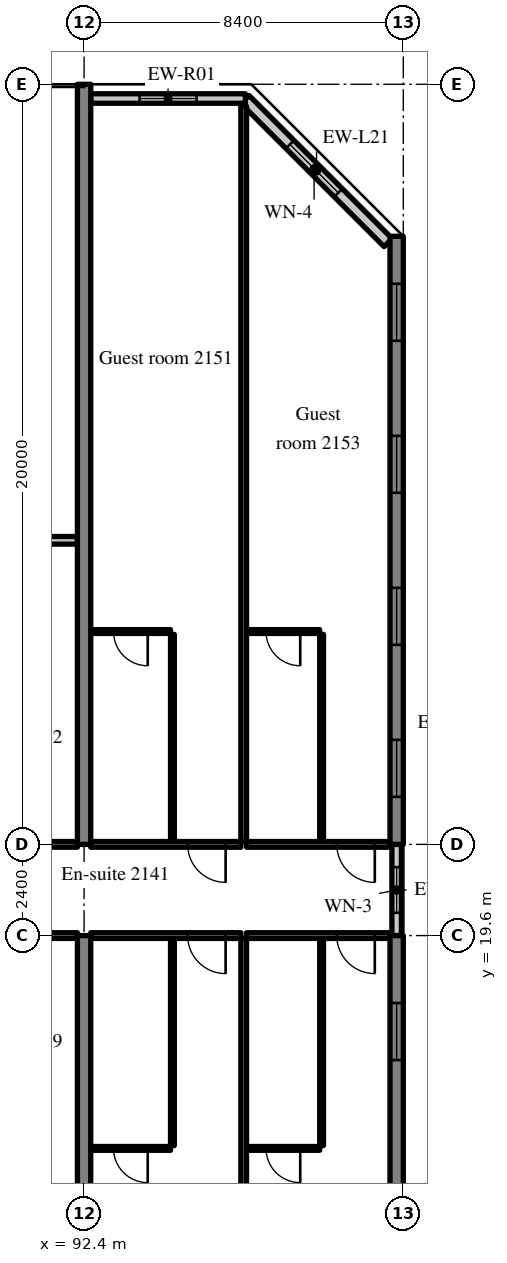
"""IFC4 building model, lengths in metres.
Left out: names, types, materials, properties, quantities, classifications, styles, units other than length and angle.
Written with IfcOpenShell. Run it as: python <this file> out.ifc"""

import sys

from ifc_helpers import new_model, si_unit, direction, frame, frame_2d, origin, place, context, subcontext, project, spatial, rectangle, extrude, source, transform, mapped, element, fill, save


model = new_model("IFC4")
c1 = context("Model", 3, precision=1e-05, world=origin(), true_north=direction((0.0, 1.0)))
c2 = subcontext(c1, "Body", "Model", "MODEL_VIEW")
j1 = project(units=[si_unit("LENGTHUNIT", "METRE"), si_unit("PLANEANGLEUNIT", "RADIAN")], contexts=[c1])
p1 = place(None, origin())
s1 = spatial("IfcSite", under=j1, at=p1, CompositionType="ELEMENT")
p2 = place(p1, origin())
s2 = spatial("IfcBuilding", under=s1, at=p2, CompositionType="ELEMENT")
p3 = place(p2, frame((0.0, 0.0, 91.4)))
s3 = spatial("IfcBuildingStorey", under=s2, at=p3, CompositionType="ELEMENT", Elevation=91.4)
m1 = source(origin(), c2, "Body", "SweptSolid", [
    extrude(rectangle(XDim=14.1, YDim=0.35, at=frame_2d((7.05, 0.0))), origin(), (0.0, 0.0, 1.0), 3.52),
])
p4 = place(p3, frame((92.4, 5.5, 0.0), z_axis=(0.0, 0.0, 1.0), x_axis=(0.0, 1.0, 0.0)))
e1 = element("IfcWall", 1, at=p4, inside=s3, PredefinedType="SHEAR", context=c2, shape_type="MappedRepresentation", body=[
    mapped(m1, transform((0.0, 0.0, 0.0), scale=1.0)),
])
m2 = source(origin(), c2, "Body", "SweptSolid", [
    extrude(rectangle(XDim=20.0, YDim=0.35, at=frame_2d((10.0, 0.0))), origin(), (0.0, 0.0, 1.0), 3.52),
])
p5 = place(p3, frame((92.4, 22.0, 0.0), z_axis=(0.0, 0.0, 1.0), x_axis=(0.0, 1.0, 0.0)))
e2 = element("IfcWall", 2, at=p5, inside=s3, PredefinedType="SHEAR", context=c2, shape_type="MappedRepresentation", body=[
    mapped(m2, transform((0.0, 0.0, 0.0), scale=1.0)),
])
m3 = source(origin(), c2, "Body", "SweptSolid", [
    extrude(rectangle(XDim=10.1, YDim=0.35, at=frame_2d((5.05, 0.0))), origin(), (0.0, 0.0, 1.0), 3.52),
])
p6 = place(p3, frame((100.625, 9.5, 0.0), z_axis=(0.0, 0.0, 1.0), x_axis=(0.0, 1.0, 0.0)))
e3 = element("IfcWall", 3, at=p6, inside=s3, PredefinedType="SHEAR", context=c2, shape_type="MappedRepresentation", body=[
    mapped(m3, transform((0.0, 0.0, 0.0), scale=1.0)),
])
m4 = source(origin(), c2, "Body", "SweptSolid", [
    extrude(rectangle(XDim=1.5, YDim=1.5, at=frame_2d((0.75, 0.75))), frame((0.0, 0.185, 0.0), z_axis=(0.0, -1.0, 0.0), x_axis=(1.0, 0.0, 0.0)), (0.0, 0.0, 1.0), 0.37),
])
p7 = place(p6, frame((1.775, 0.0, 0.9)))
e4 = element("IfcOpeningElement", 4, at=p7, cuts=e3, PredefinedType="OPENING", context=c2, shape_type="MappedRepresentation", body=[
    mapped(m4, transform((0.0, 0.0, 0.0), scale=1.0)),
])
p8 = place(p6, frame((6.825, 0.0, 0.9)))
e5 = element("IfcOpeningElement", 5, at=p8, cuts=e3, PredefinedType="OPENING", context=c2, shape_type="MappedRepresentation", body=[
    mapped(m4, transform((0.0, 0.0, 0.0), scale=1.0)),
])
m5 = source(origin(), c2, "Body", "SweptSolid", [
    extrude(rectangle(XDim=16.0, YDim=0.35, at=frame_2d((8.0, 0.0))), origin(), (0.0, 0.0, 1.0), 3.52),
])
p9 = place(p3, frame((100.625, 22.0, 0.0), z_axis=(0.0, 0.0, 1.0), x_axis=(0.0, 1.0, 0.0)))
e6 = element("IfcWall", 6, at=p9, inside=s3, PredefinedType="SHEAR", context=c2, shape_type="MappedRepresentation", body=[
    mapped(m5, transform((0.0, 0.0, 0.0), scale=1.0)),
])
p10 = place(p9, frame((1.25, 0.0, 0.9)))
e7 = element("IfcOpeningElement", 7, at=p10, cuts=e6, PredefinedType="OPENING", context=c2, shape_type="MappedRepresentation", body=[
    mapped(m4, transform((0.0, 0.0, 0.0), scale=1.0)),
])
p11 = place(p9, frame((5.25, 0.0, 0.9)))
e8 = element("IfcOpeningElement", 8, at=p11, cuts=e6, PredefinedType="OPENING", context=c2, shape_type="MappedRepresentation", body=[
    mapped(m4, transform((0.0, 0.0, 0.0), scale=1.0)),
])
p12 = place(p9, frame((9.25, 0.0, 0.9)))
e9 = element("IfcOpeningElement", 9, at=p12, cuts=e6, PredefinedType="OPENING", context=c2, shape_type="MappedRepresentation", body=[
    mapped(m4, transform((0.0, 0.0, 0.0), scale=1.0)),
])
p13 = place(p9, frame((13.25, 0.0, 0.9)))
e10 = element("IfcOpeningElement", 10, at=p13, cuts=e6, PredefinedType="OPENING", context=c2, shape_type="MappedRepresentation", body=[
    mapped(m4, transform((0.0, 0.0, 0.0), scale=1.0)),
])
m6 = source(origin(), c2, "Body", "SweptSolid", [
    extrude(rectangle(XDim=5.326, YDim=0.3, at=frame_2d((2.663, 0.0))), origin(), (0.0, 0.0, 1.0), 3.52),
])
p14 = place(p3, frame((100.4, 37.834, 0.0), z_axis=(0.0, 0.0, 1.0), x_axis=(-0.707083859269, 0.707129702361, 0.0)))
e11 = element("IfcWall", 11, at=p14, inside=s3, PredefinedType="SOLIDWALL", context=c2, shape_type="MappedRepresentation", body=[
    mapped(m6, transform((0.0, 0.0, 0.0), scale=1.0)),
])
m7 = source(origin(), c2, "Body", "SweptSolid", [
    extrude(rectangle(XDim=1.8, YDim=1.5, at=frame_2d((0.9, 0.75))), frame((0.0, 0.16, 0.0), z_axis=(0.0, -1.0, 0.0), x_axis=(1.0, 0.0, 0.0)), (0.0, 0.0, 1.0), 0.32),
])
p15 = place(p14, frame((1.854, 0.0, 0.9)))
e12 = element("IfcOpeningElement", 12, at=p15, cuts=e11, PredefinedType="OPENING", context=c2, shape_type="MappedRepresentation", body=[
    mapped(m7, transform((0.0, 0.0, 0.0), scale=1.0)),
])
m8 = source(origin(), c2, "Body", "SweptSolid", [
    extrude(rectangle(XDim=4.07, YDim=0.25, at=frame_2d((2.035, 0.0))), origin(), (0.0, 0.0, 1.0), 2.82),
])
p16 = place(p3, frame((96.645, 41.625, 0.0), z_axis=(0.0, 0.0, 1.0), x_axis=(-1.0, 0.0, 0.0)))
e13 = element("IfcWall", 13, at=p16, inside=s3, PredefinedType="SOLIDWALL", context=c2, shape_type="MappedRepresentation", body=[
    mapped(m8, transform((0.0, 0.0, 0.0), scale=1.0)),
])
m9 = source(origin(), c2, "Body", "SweptSolid", [
    extrude(rectangle(XDim=1.5, YDim=1.5, at=frame_2d((0.75, 0.75))), frame((0.0, 0.135, 0.0), z_axis=(0.0, -1.0, 0.0), x_axis=(1.0, 0.0, 0.0)), (0.0, 0.0, 1.0), 0.27),
])
p17 = place(p16, frame((1.285, 0.0, 0.9)))
e14 = element("IfcOpeningElement", 14, at=p17, cuts=e13, PredefinedType="OPENING", context=c2, shape_type="MappedRepresentation", body=[
    mapped(m9, transform((0.0, 0.0, 0.0), scale=1.0)),
])
m10 = source(origin(), c2, "Body", "SweptSolid", [
    extrude(rectangle(XDim=2.4, YDim=0.25, at=frame_2d((1.2, 0.0))), origin(), (0.0, 0.0, 1.0), 2.62),
])
p18 = place(p3, frame((100.625, 19.6, 0.0), z_axis=(0.0, 0.0, 1.0), x_axis=(0.0, 1.0, 0.0)))
e15 = element("IfcWall", 15, at=p18, inside=s3, PredefinedType="SOLIDWALL", context=c2, shape_type="MappedRepresentation", body=[
    mapped(m10, transform((0.0, 0.0, 0.0), scale=1.0)),
])
m11 = source(origin(), c2, "Body", "SweptSolid", [
    extrude(rectangle(XDim=1.2, YDim=1.5, at=frame_2d((0.6, 0.75))), frame((0.0, 0.135, 0.0), z_axis=(0.0, -1.0, 0.0), x_axis=(1.0, 0.0, 0.0)), (0.0, 0.0, 1.0), 0.27),
])
p19 = place(p18, frame((0.6, 0.0, 0.9)))
e16 = element("IfcOpeningElement", 16, at=p19, cuts=e15, PredefinedType="OPENING", context=c2, shape_type="MappedRepresentation", body=[
    mapped(m11, transform((0.0, 0.0, 0.0), scale=1.0)),
])
m12 = source(origin(), c2, "Body", "SweptSolid", [
    extrude(rectangle(XDim=3.95, YDim=0.15, at=frame_2d((1.975, 0.0))), origin(), (0.0, 0.0, 1.0), 2.82),
])
p20 = place(p3, frame((88.275, 19.6, 0.0), z_axis=(0.0, 0.0, 1.0), x_axis=(1.0, 0.0, 0.0)))
e17 = element("IfcWall", 17, at=p20, inside=s3, PredefinedType="PARTITIONING", context=c2, shape_type="MappedRepresentation", body=[
    mapped(m12, transform((0.0, 0.0, 0.0), scale=1.0)),
])
m13 = source(origin(), c2, "Body", "SweptSolid", [
    extrude(rectangle(XDim=1.0, YDim=2.1, at=frame_2d((0.5, 1.05))), frame((0.0, 0.085, 0.0), z_axis=(0.0, -1.0, 0.0), x_axis=(1.0, 0.0, 0.0)), (0.0, 0.0, 1.0), 0.17),
])
p21 = place(p20, frame((1.475, 0.0, 0.0)))
e18 = element("IfcOpeningElement", 18, at=p21, cuts=e17, PredefinedType="OPENING", context=c2, shape_type="MappedRepresentation", body=[
    mapped(m13, transform((0.0, 0.0, 0.0), scale=1.0)),
])
m14 = source(origin(), c2, "Body", "SweptSolid", [
    extrude(rectangle(XDim=5.45, YDim=0.1, at=frame_2d((2.725, 0.0))), origin(), (0.0, 0.0, 1.0), 3.52),
])
p22 = place(p3, frame((94.725, 14.075, 0.0), z_axis=(0.0, 0.0, 1.0), x_axis=(0.0, 1.0, 0.0)))
e19 = element("IfcWall", 19, at=p22, inside=s3, PredefinedType="PARTITIONING", context=c2, shape_type="MappedRepresentation", body=[
    mapped(m14, transform((0.0, 0.0, 0.0), scale=1.0)),
])
m15 = source(origin(), c2, "Body", "SweptSolid", [
    extrude(rectangle(XDim=2.1, YDim=0.1, at=frame_2d((1.05, 0.0))), origin(), (0.0, 0.0, 1.0), 3.52),
])
p23 = place(p3, frame((92.575, 14.0, 0.0), z_axis=(0.0, 0.0, 1.0), x_axis=(1.0, 0.0, 0.0)))
e20 = element("IfcWall", 20, at=p23, inside=s3, PredefinedType="PARTITIONING", context=c2, shape_type="MappedRepresentation", body=[
    mapped(m15, transform((0.0, 0.0, 0.0), scale=1.0)),
])
m16 = source(origin(), c2, "Body", "SweptSolid", [
    extrude(rectangle(XDim=0.9, YDim=2.1, at=frame_2d((0.45, 1.05))), frame((0.0, 0.06, 0.0), z_axis=(0.0, -1.0, 0.0), x_axis=(1.0, 0.0, 0.0)), (0.0, 0.0, 1.0), 0.12),
])
p24 = place(p23, frame((0.6, 0.0, 0.0)))
e21 = element("IfcOpeningElement", 21, at=p24, cuts=e20, PredefinedType="OPENING", context=c2, shape_type="MappedRepresentation", body=[
    mapped(m16, transform((0.0, 0.0, 0.0), scale=1.0)),
])
m17 = source(origin(), c2, "Body", "SweptSolid", [
    extrude(rectangle(XDim=3.95, YDim=0.15, at=frame_2d((1.975, 0.0))), origin(), (0.0, 0.0, 1.0), 2.82),
])
p25 = place(p3, frame((92.575, 19.6, 0.0), z_axis=(0.0, 0.0, 1.0), x_axis=(1.0, 0.0, 0.0)))
e22 = element("IfcWall", 22, at=p25, inside=s3, PredefinedType="PARTITIONING", context=c2, shape_type="MappedRepresentation", body=[
    mapped(m17, transform((0.0, 0.0, 0.0), scale=1.0)),
])
p26 = place(p25, frame((2.55, 0.0, 0.0)))
e23 = element("IfcOpeningElement", 23, at=p26, cuts=e22, PredefinedType="OPENING", context=c2, shape_type="MappedRepresentation", body=[
    mapped(m13, transform((0.0, 0.0, 0.0), scale=1.0)),
])
p27 = place(p3, frame((98.65, 14.075, 0.0), z_axis=(0.0, 0.0, 1.0), x_axis=(0.0, 1.0, 0.0)))
e24 = element("IfcWall", 24, at=p27, inside=s3, PredefinedType="PARTITIONING", context=c2, shape_type="MappedRepresentation", body=[
    mapped(m14, transform((0.0, 0.0, 0.0), scale=1.0)),
])
m18 = source(origin(), c2, "Body", "SweptSolid", [
    extrude(rectangle(XDim=1.925, YDim=0.1, at=frame_2d((0.962, 0.0))), origin(), (0.0, 0.0, 1.0), 3.52),
])
p28 = place(p3, frame((96.675, 14.0, 0.0), z_axis=(0.0, 0.0, 1.0), x_axis=(1.0, 0.0, 0.0)))
e25 = element("IfcWall", 25, at=p28, inside=s3, PredefinedType="PARTITIONING", context=c2, shape_type="MappedRepresentation", body=[
    mapped(m18, transform((0.0, 0.0, 0.0), scale=1.0)),
])
p29 = place(p28, frame((0.513, 0.0, 0.0)))
e26 = element("IfcOpeningElement", 26, at=p29, cuts=e25, PredefinedType="OPENING", context=c2, shape_type="MappedRepresentation", body=[
    mapped(m16, transform((0.0, 0.0, 0.0), scale=1.0)),
])
m19 = source(origin(), c2, "Body", "SweptSolid", [
    extrude(rectangle(XDim=3.775, YDim=0.15, at=frame_2d((1.887, 0.0))), origin(), (0.0, 0.0, 1.0), 2.82),
])
p30 = place(p3, frame((96.675, 19.6, 0.0), z_axis=(0.0, 0.0, 1.0), x_axis=(1.0, 0.0, 0.0)))
e27 = element("IfcWall", 27, at=p30, inside=s3, PredefinedType="PARTITIONING", context=c2, shape_type="MappedRepresentation", body=[
    mapped(m19, transform((0.0, 0.0, 0.0), scale=1.0)),
])
p31 = place(p30, frame((2.375, 0.0, 0.0)))
e28 = element("IfcOpeningElement", 28, at=p31, cuts=e27, PredefinedType="OPENING", context=c2, shape_type="MappedRepresentation", body=[
    mapped(m13, transform((0.0, 0.0, 0.0), scale=1.0)),
])
m20 = source(origin(), c2, "Body", "SweptSolid", [
    extrude(rectangle(XDim=13.447, YDim=0.15, at=frame_2d((6.724, 0.0))), origin(), (0.0, 0.0, 1.0), 3.52),
])
p32 = place(p3, frame((96.6, 6.078, 0.0), z_axis=(0.0, 0.0, 1.0), x_axis=(0.0, 1.0, 0.0)))
e29 = element("IfcWall", 29, at=p32, inside=s3, PredefinedType="PARTITIONING", context=c2, shape_type="MappedRepresentation", body=[
    mapped(m20, transform((0.0, 0.0, 0.0), scale=1.0)),
])
m21 = source(origin(), c2, "Body", "SweptSolid", [
    extrude(rectangle(XDim=8.05, YDim=0.15, at=frame_2d((4.025, 0.0))), origin(), (0.0, 0.0, 1.0), 2.82),
])
p33 = place(p3, frame((84.175, 22.0, 0.0), z_axis=(0.0, 0.0, 1.0), x_axis=(1.0, 0.0, 0.0)))
e30 = element("IfcWall", 30, at=p33, inside=s3, PredefinedType="PARTITIONING", context=c2, shape_type="MappedRepresentation", body=[
    mapped(m21, transform((0.0, 0.0, 0.0), scale=1.0)),
])
m22 = source(origin(), c2, "Body", "SweptSolid", [
    extrude(rectangle(XDim=1.8, YDim=2.1, at=frame_2d((0.9, 1.05))), frame((0.0, 0.085, 0.0), z_axis=(0.0, -1.0, 0.0), x_axis=(1.0, 0.0, 0.0)), (0.0, 0.0, 1.0), 0.17),
])
p34 = place(p33, frame((3.125, 0.0, 0.0)))
e31 = element("IfcOpeningElement", 31, at=p34, cuts=e30, PredefinedType="OPENING", context=c2, shape_type="MappedRepresentation", body=[
    mapped(m22, transform((0.0, 0.0, 0.0), scale=1.0)),
])
m23 = source(origin(), c2, "Body", "SweptSolid", [
    extrude(rectangle(XDim=8.05, YDim=0.2, at=frame_2d((4.025, 0.0))), origin(), (0.0, 0.0, 1.0), 3.52),
])
p35 = place(p3, frame((84.175, 30.0, 0.0), z_axis=(0.0, 0.0, 1.0), x_axis=(1.0, 0.0, 0.0)))
e32 = element("IfcWall", 32, at=p35, inside=s3, PredefinedType="PARTITIONING", context=c2, shape_type="MappedRepresentation", body=[
    mapped(m23, transform((0.0, 0.0, 0.0), scale=1.0)),
])
p36 = place(p3, frame((94.725, 22.075, 0.0), z_axis=(0.0, 0.0, 1.0), x_axis=(0.0, 1.0, 0.0)))
e33 = element("IfcWall", 33, at=p36, inside=s3, PredefinedType="PARTITIONING", context=c2, shape_type="MappedRepresentation", body=[
    mapped(m14, transform((0.0, 0.0, 0.0), scale=1.0)),
])
p37 = place(p3, frame((92.575, 27.6, 0.0), z_axis=(0.0, 0.0, 1.0), x_axis=(1.0, 0.0, 0.0)))
e34 = element("IfcWall", 34, at=p37, inside=s3, PredefinedType="PARTITIONING", context=c2, shape_type="MappedRepresentation", body=[
    mapped(m15, transform((0.0, 0.0, 0.0), scale=1.0)),
])
p38 = place(p37, frame((0.6, 0.0, 0.0)))
e35 = element("IfcOpeningElement", 35, at=p38, cuts=e34, PredefinedType="OPENING", context=c2, shape_type="MappedRepresentation", body=[
    mapped(m16, transform((0.0, 0.0, 0.0), scale=1.0)),
])
p39 = place(p3, frame((92.575, 22.0, 0.0), z_axis=(0.0, 0.0, 1.0), x_axis=(1.0, 0.0, 0.0)))
e36 = element("IfcWall", 36, at=p39, inside=s3, PredefinedType="PARTITIONING", context=c2, shape_type="MappedRepresentation", body=[
    mapped(m17, transform((0.0, 0.0, 0.0), scale=1.0)),
])
p40 = place(p39, frame((2.55, 0.0, 0.0)))
e37 = element("IfcOpeningElement", 37, at=p40, cuts=e36, PredefinedType="OPENING", context=c2, shape_type="MappedRepresentation", body=[
    mapped(m13, transform((0.0, 0.0, 0.0), scale=1.0)),
])
p41 = place(p3, frame((98.65, 22.075, 0.0), z_axis=(0.0, 0.0, 1.0), x_axis=(0.0, 1.0, 0.0)))
e38 = element("IfcWall", 38, at=p41, inside=s3, PredefinedType="PARTITIONING", context=c2, shape_type="MappedRepresentation", body=[
    mapped(m14, transform((0.0, 0.0, 0.0), scale=1.0)),
])
p42 = place(p3, frame((96.675, 27.6, 0.0), z_axis=(0.0, 0.0, 1.0), x_axis=(1.0, 0.0, 0.0)))
e39 = element("IfcWall", 39, at=p42, inside=s3, PredefinedType="PARTITIONING", context=c2, shape_type="MappedRepresentation", body=[
    mapped(m18, transform((0.0, 0.0, 0.0), scale=1.0)),
])
p43 = place(p42, frame((0.513, 0.0, 0.0)))
e40 = element("IfcOpeningElement", 40, at=p43, cuts=e39, PredefinedType="OPENING", context=c2, shape_type="MappedRepresentation", body=[
    mapped(m16, transform((0.0, 0.0, 0.0), scale=1.0)),
])
p44 = place(p3, frame((96.675, 22.0, 0.0), z_axis=(0.0, 0.0, 1.0), x_axis=(1.0, 0.0, 0.0)))
e41 = element("IfcWall", 41, at=p44, inside=s3, PredefinedType="PARTITIONING", context=c2, shape_type="MappedRepresentation", body=[
    mapped(m19, transform((0.0, 0.0, 0.0), scale=1.0)),
])
p45 = place(p44, frame((2.375, 0.0, 0.0)))
e42 = element("IfcOpeningElement", 42, at=p45, cuts=e41, PredefinedType="OPENING", context=c2, shape_type="MappedRepresentation", body=[
    mapped(m13, transform((0.0, 0.0, 0.0), scale=1.0)),
])
m24 = source(origin(), c2, "Body", "SweptSolid", [
    extrude(rectangle(XDim=19.347, YDim=0.15, at=frame_2d((9.674, 0.0))), origin(), (0.0, 0.0, 1.0), 3.52),
])
p46 = place(p3, frame((96.6, 22.075, 0.0), z_axis=(0.0, 0.0, 1.0), x_axis=(0.0, 1.0, 0.0)))
e43 = element("IfcWall", 43, at=p46, inside=s3, PredefinedType="PARTITIONING", context=c2, shape_type="MappedRepresentation", body=[
    mapped(m24, transform((0.0, 0.0, 0.0), scale=1.0)),
])
m25 = source(origin(), c2, "Body", "SweptSolid", [
    extrude(rectangle(XDim=1.8, YDim=1.5, at=frame_2d((0.9, 0.75))), frame((0.0, 0.03, 0.0), z_axis=(0.0, -1.0, 0.0), x_axis=(1.0, 0.0, 0.0)), (0.0, 0.0, 1.0), 0.06),
])
p47 = place(p15, origin())
e44 = element("IfcWindow", 44, at=p47, inside=s3, PartitioningType="SINGLE_PANEL", PredefinedType="WINDOW", context=c2, shape_type="MappedRepresentation", body=[
    mapped(m25, transform((0.0, 0.0, 0.0), scale=1.0)),
])
fill(e12, e44)
m26 = source(origin(), c2, "Body", "SweptSolid", [
    extrude(rectangle(XDim=1.5, YDim=1.5, at=frame_2d((0.75, 0.75))), frame((0.0, 0.03, 0.0), z_axis=(0.0, -1.0, 0.0), x_axis=(1.0, 0.0, 0.0)), (0.0, 0.0, 1.0), 0.06),
])
p48 = place(p17, origin())
e45 = element("IfcWindow", 45, at=p48, inside=s3, PartitioningType="SINGLE_PANEL", PredefinedType="WINDOW", context=c2, shape_type="MappedRepresentation", body=[
    mapped(m26, transform((0.0, 0.0, 0.0), scale=1.0)),
])
fill(e14, e45)
p49 = place(p8, origin())
e46 = element("IfcWindow", 46, at=p49, inside=s3, PartitioningType="SINGLE_PANEL", PredefinedType="WINDOW", context=c2, shape_type="MappedRepresentation", body=[
    mapped(m26, transform((0.0, 0.0, 0.0), scale=1.0)),
])
fill(e5, e46)
p50 = place(p10, origin())
e47 = element("IfcWindow", 47, at=p50, inside=s3, PartitioningType="SINGLE_PANEL", PredefinedType="WINDOW", context=c2, shape_type="MappedRepresentation", body=[
    mapped(m26, transform((0.0, 0.0, 0.0), scale=1.0)),
])
fill(e7, e47)
p51 = place(p11, origin())
e48 = element("IfcWindow", 48, at=p51, inside=s3, PartitioningType="SINGLE_PANEL", PredefinedType="WINDOW", context=c2, shape_type="MappedRepresentation", body=[
    mapped(m26, transform((0.0, 0.0, 0.0), scale=1.0)),
])
fill(e8, e48)
p52 = place(p12, origin())
e49 = element("IfcWindow", 49, at=p52, inside=s3, PartitioningType="SINGLE_PANEL", PredefinedType="WINDOW", context=c2, shape_type="MappedRepresentation", body=[
    mapped(m26, transform((0.0, 0.0, 0.0), scale=1.0)),
])
fill(e9, e49)
p53 = place(p13, origin())
e50 = element("IfcWindow", 50, at=p53, inside=s3, PartitioningType="SINGLE_PANEL", PredefinedType="WINDOW", context=c2, shape_type="MappedRepresentation", body=[
    mapped(m26, transform((0.0, 0.0, 0.0), scale=1.0)),
])
fill(e10, e50)
m27 = source(origin(), c2, "Body", "SweptSolid", [
    extrude(rectangle(XDim=1.2, YDim=1.5, at=frame_2d((0.6, 0.75))), frame((0.0, 0.03, 0.0), z_axis=(0.0, -1.0, 0.0), x_axis=(1.0, 0.0, 0.0)), (0.0, 0.0, 1.0), 0.06),
])
p54 = place(p19, origin())
e51 = element("IfcWindow", 51, at=p54, inside=s3, PartitioningType="SINGLE_PANEL", PredefinedType="WINDOW", context=c2, shape_type="MappedRepresentation", body=[
    mapped(m27, transform((0.0, 0.0, 0.0), scale=1.0)),
])
fill(e16, e51)
m28 = source(origin(), c2, "Body", "SweptSolid", [
    extrude(rectangle(XDim=0.9, YDim=2.1, at=frame_2d((0.45, 1.05))), frame((0.0, 0.025, 0.0), z_axis=(0.0, -1.0, 0.0), x_axis=(1.0, 0.0, 0.0)), (0.0, 0.0, 1.0), 0.05),
])
p55 = place(p24, origin())
e52 = element("IfcDoor", 52, at=p55, inside=s3, OperationType="SINGLE_SWING_RIGHT", PredefinedType="DOOR", context=c2, shape_type="MappedRepresentation", body=[
    mapped(m28, transform((0.0, 0.0, 0.0), scale=1.0)),
])
fill(e21, e52)
m29 = source(origin(), c2, "Body", "SweptSolid", [
    extrude(rectangle(XDim=1.0, YDim=2.1, at=frame_2d((0.5, 1.05))), frame((0.0, 0.025, 0.0), z_axis=(0.0, -1.0, 0.0), x_axis=(1.0, 0.0, 0.0)), (0.0, 0.0, 1.0), 0.05),
])
p56 = place(p26, origin())
e53 = element("IfcDoor", 53, at=p56, inside=s3, OperationType="SINGLE_SWING_RIGHT", PredefinedType="DOOR", context=c2, shape_type="MappedRepresentation", body=[
    mapped(m29, transform((0.0, 0.0, 0.0), scale=1.0)),
])
fill(e23, e53)
p57 = place(p29, origin())
e54 = element("IfcDoor", 54, at=p57, inside=s3, OperationType="SINGLE_SWING_RIGHT", PredefinedType="DOOR", context=c2, shape_type="MappedRepresentation", body=[
    mapped(m28, transform((0.0, 0.0, 0.0), scale=1.0)),
])
fill(e26, e54)
p58 = place(p31, origin())
e55 = element("IfcDoor", 55, at=p58, inside=s3, OperationType="SINGLE_SWING_RIGHT", PredefinedType="DOOR", context=c2, shape_type="MappedRepresentation", body=[
    mapped(m29, transform((0.0, 0.0, 0.0), scale=1.0)),
])
fill(e28, e55)
p59 = place(p38, origin())
e56 = element("IfcDoor", 56, at=p59, inside=s3, OperationType="SINGLE_SWING_RIGHT", PredefinedType="DOOR", context=c2, shape_type="MappedRepresentation", body=[
    mapped(m28, transform((0.0, 0.0, 0.0), scale=1.0)),
])
fill(e35, e56)
p60 = place(p40, origin())
e57 = element("IfcDoor", 57, at=p60, inside=s3, OperationType="SINGLE_SWING_RIGHT", PredefinedType="DOOR", context=c2, shape_type="MappedRepresentation", body=[
    mapped(m29, transform((0.0, 0.0, 0.0), scale=1.0)),
])
fill(e37, e57)
p61 = place(p43, origin())
e58 = element("IfcDoor", 58, at=p61, inside=s3, OperationType="SINGLE_SWING_RIGHT", PredefinedType="DOOR", context=c2, shape_type="MappedRepresentation", body=[
    mapped(m28, transform((0.0, 0.0, 0.0), scale=1.0)),
])
fill(e40, e58)
p62 = place(p45, origin())
e59 = element("IfcDoor", 59, at=p62, inside=s3, OperationType="SINGLE_SWING_RIGHT", PredefinedType="DOOR", context=c2, shape_type="MappedRepresentation", body=[
    mapped(m29, transform((0.0, 0.0, 0.0), scale=1.0)),
])
fill(e42, e59)
save(model, sys.argv[1])
